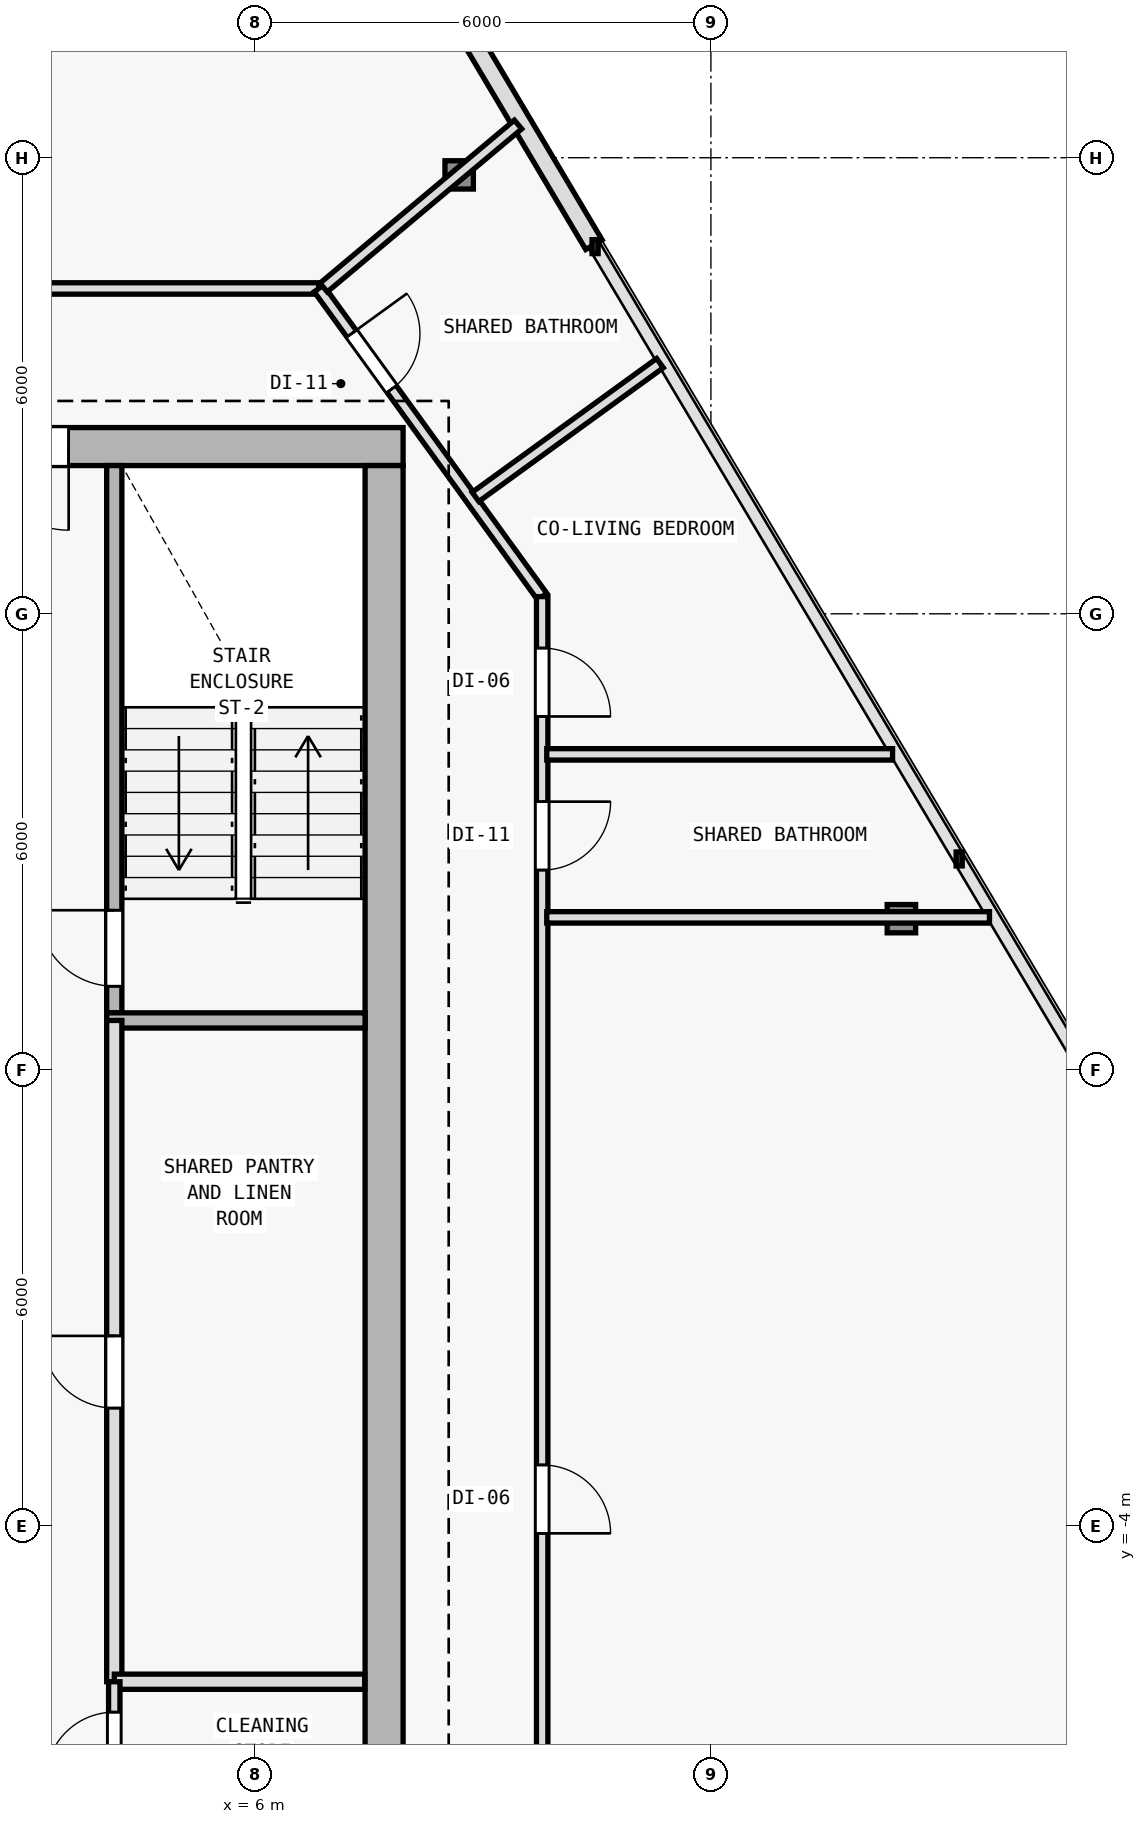
"""IFC4 building model, lengths in metres.
Left out: names, types, materials, properties, quantities, classifications, styles, units other than length and angle.
Written with IfcOpenShell. Run it as: python <this file> out.ifc"""

import sys

from ifc_helpers import new_model, si_unit, direction, frame, frame_2d, origin, origin_2d, place, context, subcontext, project, spatial, rectangle, i_section, extrude, element, fill, save


model = new_model("IFC4")
c1 = context("Model", 3, precision=1e-05, world=origin(), true_north=direction((0.0, 1.0)))
c2 = subcontext(c1, "Body", "Model", "MODEL_VIEW")
j1 = project(units=[si_unit("LENGTHUNIT", "METRE"), si_unit("PLANEANGLEUNIT", "RADIAN")], contexts=[c1])
p1 = place(None, origin())
s1 = spatial("IfcSite", under=j1, at=p1, CompositionType="ELEMENT")
p2 = place(p1, origin())
s2 = spatial("IfcBuilding", under=s1, at=p2, CompositionType="ELEMENT")
p3 = place(p2, frame((0.0, 0.0, 219.9)))
s3 = spatial("IfcBuildingStorey", under=s2, at=p3, CompositionType="ELEMENT", Elevation=219.9)
for number, where, z_axis, x_axis in (
    (1, (7.7, 10.2, 0.0), (0.0, 0.0, 1.0), (1.0, 0.0, 0.0)),
    (2, (7.7, 0.4, 0.0), (0.0, 0.0, 1.0), (1.0, 0.0, 0.0)),
):
    element("IfcColumn", number, at=place(p3, frame(where, z_axis=z_axis, x_axis=x_axis)), inside=s3, PredefinedType="COLUMN", context=c2, shape_type="SweptSolid", body=[
        extrude(i_section(OverallWidth=0.398, OverallDepth=0.387, WebThickness=0.013, FlangeThickness=0.022, FilletRadius=0.015, at=origin_2d()), origin(), (0.0, 0.0, 1.0), 3.6),
    ])
p4 = place(p3, frame((14.506, 3.989, 0.006), z_axis=(-0.018907314261, 0.009589680974, 0.999775250487), x_axis=(-0.452339157861, -0.891845999187, 0.0)))
e3 = element("IfcColumn", 3, at=p4, inside=s3, PredefinedType="COLUMN", context=c2, shape_type="SweptSolid", body=[
    extrude(i_section(OverallWidth=0.374, OverallDepth=0.372, WebThickness=0.012, FlangeThickness=0.02, FilletRadius=0.015, at=origin_2d()), origin(), (0.0, 0.0, 1.0), 3.59),
])
p5 = place(p3, frame((8.688, 13.774, 0.006), z_axis=(-0.011699842352, -0.002516826552, 0.999928387072), x_axis=(0.210305364179, -0.977635746993, 0.0)))
e4 = element("IfcColumn", 4, at=p5, inside=s3, PredefinedType="COLUMN", context=c2, shape_type="SweptSolid", body=[
    extrude(i_section(OverallWidth=0.374, OverallDepth=0.372, WebThickness=0.012, FlangeThickness=0.02, FilletRadius=0.015, at=origin_2d()), origin(), (0.0, 0.0, 1.0), 3.589),
])
p6 = place(p3, frame((5.396, 21.375, 0.0), z_axis=(0.0, 0.0, 1.0), x_axis=(0.511082771111, -0.85953150092, 0.0)))
e5 = element("IfcWall", 5, at=p6, inside=s3, PredefinedType="SOLIDWALL", context=c2, shape_type="SweptSolid", body=[
    extrude(rectangle(XDim=9.911, YDim=0.25, at=frame_2d((4.955, 0.0))), origin(), (0.0, 0.0, 1.0), 3.35),
])
p7 = place(p6, frame((4.205, 0.0, 0.62)))
e6 = element("IfcOpeningElement", 6, at=p7, cuts=e5, PredefinedType="OPENING", context=c2, shape_type="SweptSolid", body=[
    extrude(rectangle(XDim=1.5, YDim=2.0, at=frame_2d((0.75, 1.0))), frame((0.0, 0.135, 0.0), z_axis=(0.0, -1.0, 0.0), x_axis=(1.0, 0.0, 0.0)), (0.0, 0.0, 1.0), 0.27),
])
p8 = place(p3, frame((7.95, 10.2, 0.0), z_axis=(0.0, 0.0, 1.0), x_axis=(-1.0, 0.0, 0.0)))
e7 = element("IfcWall", 7, at=p8, inside=s3, PredefinedType="SHEAR", context=c2, shape_type="SweptSolid", body=[
    extrude(rectangle(XDim=15.9, YDim=0.5, at=frame_2d((7.95, 0.0))), origin(), (0.0, 0.0, 1.0), 3.35),
])
p9 = place(p8, frame((4.4, 0.0, 0.0)))
e8 = element("IfcOpeningElement", 8, at=p9, cuts=e7, PredefinedType="OPENING", context=c2, shape_type="SweptSolid", body=[
    extrude(rectangle(XDim=1.1, YDim=2.15, at=frame_2d((0.55, 1.075))), frame((0.0, 0.26, 0.0), z_axis=(0.0, -1.0, 0.0), x_axis=(1.0, 0.0, 0.0)), (0.0, 0.0, 1.0), 0.52),
])
p10 = place(p3, frame((7.7, 9.95, 0.0), z_axis=(0.0, 0.0, 1.0), x_axis=(0.0, -1.0, 0.0)))
e9 = element("IfcWall", 9, at=p10, inside=s3, PredefinedType="SHEAR", context=c2, shape_type="SweptSolid", body=[
    extrude(rectangle(XDim=19.1, YDim=0.5, at=frame_2d((9.55, 0.0))), origin(), (0.0, 0.0, 1.0), 3.35),
])
p11 = place(p3, frame((4.15, 2.75, 0.0), z_axis=(0.0, 0.0, 1.0), x_axis=(0.0, 1.0, 0.0)))
e10 = element("IfcWall", 10, at=p11, inside=s3, PredefinedType="SOLIDWALL", context=c2, shape_type="SweptSolid", body=[
    extrude(rectangle(XDim=7.2, YDim=0.2, at=frame_2d((3.6, 0.0))), origin(), (0.0, 0.0, 1.0), 3.35),
])
p12 = place(p11, frame((0.35, 0.0, 0.0)))
e11 = element("IfcOpeningElement", 11, at=p12, cuts=e10, PredefinedType="OPENING", context=c2, shape_type="SweptSolid", body=[
    extrude(rectangle(XDim=1.0, YDim=2.15, at=frame_2d((0.5, 1.075))), frame((0.0, 0.11, 0.0), z_axis=(0.0, -1.0, 0.0), x_axis=(1.0, 0.0, 0.0)), (0.0, 0.0, 1.0), 0.22),
])
p13 = place(p3, frame((4.05, 2.65, 0.0), z_axis=(0.0, 0.0, 1.0), x_axis=(1.0, 0.0, 0.0)))
e12 = element("IfcWall", 12, at=p13, inside=s3, PredefinedType="SOLIDWALL", context=c2, shape_type="SweptSolid", body=[
    extrude(rectangle(XDim=3.4, YDim=0.2, at=frame_2d((1.7, 0.0))), origin(), (0.0, 0.0, 1.0), 3.35),
])
p14 = place(p3, frame((4.15, -6.05, 0.0), z_axis=(0.0, 0.0, 1.0), x_axis=(0.0, 1.0, 0.0)))
e13 = element("IfcWall", 13, at=p14, inside=s3, PredefinedType="SOLIDWALL", context=c2, shape_type="SweptSolid", body=[
    extrude(rectangle(XDim=8.7, YDim=0.2, at=frame_2d((4.35, 0.0))), origin(), (0.0, 0.0, 1.0), 3.35),
])
p15 = place(p14, frame((3.6, 0.0, 0.0)))
e14 = element("IfcOpeningElement", 14, at=p15, cuts=e13, PredefinedType="OPENING", context=c2, shape_type="SweptSolid", body=[
    extrude(rectangle(XDim=0.95, YDim=2.1, at=frame_2d((0.475, 1.05))), frame((0.0, 0.11, 0.0), z_axis=(0.0, -1.0, 0.0), x_axis=(1.0, 0.0, 0.0)), (0.0, 0.0, 1.0), 0.22),
])
p16 = place(p3, frame((4.15, -6.05, 0.0), z_axis=(0.0, 0.0, 1.0), x_axis=(1.0, 0.0, 0.0)))
e15 = element("IfcWall", 15, at=p16, inside=s3, PredefinedType="SOLIDWALL", context=c2, shape_type="SweptSolid", body=[
    extrude(rectangle(XDim=3.295, YDim=0.2, at=frame_2d((1.647, 0.0))), origin(), (0.0, 0.0, 1.0), 3.35),
])
p17 = place(p3, frame((4.15, -9.145, 0.0), z_axis=(0.0, 0.0, 1.0), x_axis=(0.0, 1.0, 0.0)))
e16 = element("IfcWall", 16, at=p17, inside=s3, PredefinedType="PARTITIONING", context=c2, shape_type="SweptSolid", body=[
    extrude(rectangle(XDim=3.095, YDim=0.15, at=frame_2d((1.547, 0.0))), origin(), (0.0, 0.0, 1.0), 3.35),
])
p18 = place(p17, frame((0.245, 0.0, 0.0)))
e17 = element("IfcOpeningElement", 17, at=p18, cuts=e16, PredefinedType="OPENING", context=c2, shape_type="SweptSolid", body=[
    extrude(rectangle(XDim=0.9, YDim=2.1, at=frame_2d((0.45, 1.05))), frame((0.0, 0.085, 0.0), z_axis=(0.0, -1.0, 0.0), x_axis=(1.0, 0.0, 0.0)), (0.0, 0.0, 1.0), 0.17),
])
p19 = place(p17, frame((1.795, 0.0, 0.0)))
e18 = element("IfcOpeningElement", 18, at=p19, cuts=e16, PredefinedType="OPENING", context=c2, shape_type="SweptSolid", body=[
    extrude(rectangle(XDim=0.9, YDim=2.1, at=frame_2d((0.45, 1.05))), frame((0.0, 0.085, 0.0), z_axis=(0.0, -1.0, 0.0), x_axis=(1.0, 0.0, 0.0)), (0.0, 0.0, 1.0), 0.17),
])
p20 = place(p3, frame((-6.841, 12.28, 0.0), z_axis=(0.0, 0.0, 1.0), x_axis=(1.0, 0.0, 0.0)))
e19 = element("IfcWall", 19, at=p20, inside=s3, PredefinedType="PARTITIONING", context=c2, shape_type="SweptSolid", body=[
    extrude(rectangle(XDim=13.682, YDim=0.15, at=frame_2d((6.841, 0.0))), origin(), (0.0, 0.0, 1.0), 3.005),
])
p21 = place(p20, frame((6.391, 0.0, 0.0)))
e20 = element("IfcOpeningElement", 20, at=p21, cuts=e19, PredefinedType="OPENING", context=c2, shape_type="SweptSolid", body=[
    extrude(rectangle(XDim=0.9, YDim=2.1, at=frame_2d((0.45, 1.05))), frame((0.0, 0.085, 0.0), z_axis=(0.0, -1.0, 0.0), x_axis=(1.0, 0.0, 0.0)), (0.0, 0.0, 1.0), 0.17),
])
p22 = place(p3, frame((6.841, 12.28, 0.0), z_axis=(0.0, 0.0, 1.0), x_axis=(0.586956386413, -0.809618552436, 0.0)))
e21 = element("IfcWall", 21, at=p22, inside=s3, PredefinedType="PARTITIONING", context=c2, shape_type="SweptSolid", body=[
    extrude(rectangle(XDim=5.008, YDim=0.15, at=frame_2d((2.504, 0.0))), origin(), (0.0, 0.0, 1.0), 2.825),
])
p23 = place(p22, frame((0.734, 0.0, 0.0)))
e22 = element("IfcOpeningElement", 22, at=p23, cuts=e21, PredefinedType="OPENING", context=c2, shape_type="SweptSolid", body=[
    extrude(rectangle(XDim=0.9, YDim=2.1, at=frame_2d((0.45, 1.05))), frame((0.0, 0.085, 0.0), z_axis=(0.0, -1.0, 0.0), x_axis=(1.0, 0.0, 0.0)), (0.0, 0.0, 1.0), 0.17),
])
p24 = place(p3, frame((9.78, 8.226, 0.0), z_axis=(0.0, 0.0, 1.0), x_axis=(0.0, -1.0, 0.0)))
e23 = element("IfcWall", 23, at=p24, inside=s3, PredefinedType="PARTITIONING", context=c2, shape_type="SweptSolid", body=[
    extrude(rectangle(XDim=19.706, YDim=0.15, at=frame_2d((9.853, 0.0))), origin(), (0.0, 0.0, 1.0), 2.725),
])
p25 = place(p24, frame((11.424, 0.0, 0.0)))
e24 = element("IfcOpeningElement", 24, at=p25, cuts=e23, PredefinedType="OPENING", context=c2, shape_type="SweptSolid", body=[
    extrude(rectangle(XDim=0.9, YDim=2.1, at=frame_2d((0.45, 1.05))), frame((0.0, 0.085, 0.0), z_axis=(0.0, -1.0, 0.0), x_axis=(1.0, 0.0, 0.0)), (0.0, 0.0, 1.0), 0.17),
])
p26 = place(p24, frame((2.698, 0.0, 0.0)))
e25 = element("IfcOpeningElement", 25, at=p26, cuts=e23, PredefinedType="OPENING", context=c2, shape_type="SweptSolid", body=[
    extrude(rectangle(XDim=0.9, YDim=2.1, at=frame_2d((0.45, 1.05))), frame((0.0, 0.085, 0.0), z_axis=(0.0, -1.0, 0.0), x_axis=(1.0, 0.0, 0.0)), (0.0, 0.0, 1.0), 0.17),
])
p27 = place(p24, frame((0.677, 0.0, 0.0)))
e26 = element("IfcOpeningElement", 26, at=p27, cuts=e23, PredefinedType="OPENING", context=c2, shape_type="SweptSolid", body=[
    extrude(rectangle(XDim=0.9, YDim=2.1, at=frame_2d((0.45, 1.05))), frame((0.0, 0.085, 0.0), z_axis=(0.0, -1.0, 0.0), x_axis=(1.0, 0.0, 0.0)), (0.0, 0.0, 1.0), 0.17),
])
p28 = place(p3, frame((9.84, 4.006, 0.0), z_axis=(0.0, 0.0, 1.0), x_axis=(1.0, 0.0, 0.0)))
e27 = element("IfcWall", 27, at=p28, inside=s3, PredefinedType="PARTITIONING", context=c2, shape_type="SweptSolid", body=[
    extrude(rectangle(XDim=5.825, YDim=0.15, at=frame_2d((2.913, 0.0))), origin(), (0.0, 0.0, 1.0), 2.825),
])
p29 = place(p3, frame((6.905, 12.292, 0.0), z_axis=(0.0, 0.0, 1.0), x_axis=(0.766305376551, 0.642476513088, 0.0)))
e28 = element("IfcWall", 28, at=p29, inside=s3, PredefinedType="PARTITIONING", context=c2, shape_type="SweptSolid", body=[
    extrude(rectangle(XDim=3.338, YDim=0.15, at=frame_2d((1.669, 0.0))), origin(), (0.0, 0.0, 1.0), 2.975),
])
p30 = place(p3, frame((8.903, 9.538, 0.0), z_axis=(0.0, 0.0, 1.0), x_axis=(0.809591090344, 0.586994264397, 0.0)))
e29 = element("IfcWall", 29, at=p30, inside=s3, PredefinedType="PARTITIONING", context=c2, shape_type="SweptSolid", body=[
    extrude(rectangle(XDim=2.998, YDim=0.15, at=frame_2d((1.499, 0.0))), origin(), (0.0, 0.0, 1.0), 2.825),
])
p31 = place(p3, frame((9.84, 6.15, 0.0), z_axis=(0.0, 0.0, 1.0), x_axis=(1.0, 0.0, 0.0)))
e30 = element("IfcWall", 30, at=p31, inside=s3, PredefinedType="PARTITIONING", context=c2, shape_type="SweptSolid", body=[
    extrude(rectangle(XDim=4.55, YDim=0.15, at=frame_2d((2.275, 0.0))), origin(), (0.0, 0.0, 1.0), 2.825),
])
p32 = place(p9, origin())
e31 = element("IfcDoor", 31, at=p32, inside=s3, OperationType="SINGLE_SWING_LEFT", PredefinedType="DOOR", context=c2, shape_type="SweptSolid", body=[
    extrude(rectangle(XDim=1.1, YDim=2.15, at=frame_2d((0.55, 1.075))), frame((0.0, 0.025, 0.0), z_axis=(0.0, -1.0, 0.0), x_axis=(1.0, 0.0, 0.0)), (0.0, 0.0, 1.0), 0.05),
])
fill(e8, e31)
p33 = place(p12, origin())
e32 = element("IfcDoor", 32, at=p33, inside=s3, OperationType="SINGLE_SWING_RIGHT", PredefinedType="DOOR", context=c2, shape_type="SweptSolid", body=[
    extrude(rectangle(XDim=1.0, YDim=2.15, at=frame_2d((0.5, 1.075))), frame((0.0, 0.025, 0.0), z_axis=(0.0, -1.0, 0.0), x_axis=(1.0, 0.0, 0.0)), (0.0, 0.0, 1.0), 0.05),
])
fill(e11, e32)
p34 = place(p15, origin())
e33 = element("IfcDoor", 33, at=p34, inside=s3, OperationType="SINGLE_SWING_RIGHT", PredefinedType="DOOR", context=c2, shape_type="SweptSolid", body=[
    extrude(rectangle(XDim=0.95, YDim=2.1, at=frame_2d((0.475, 1.05))), frame((0.0, 0.025, 0.0), z_axis=(0.0, -1.0, 0.0), x_axis=(1.0, 0.0, 0.0)), (0.0, 0.0, 1.0), 0.05),
])
fill(e14, e33)
p35 = place(p19, origin())
e34 = element("IfcDoor", 34, at=p35, inside=s3, OperationType="SINGLE_SWING_LEFT", PredefinedType="DOOR", context=c2, shape_type="SweptSolid", body=[
    extrude(rectangle(XDim=0.9, YDim=2.1, at=frame_2d((0.45, 1.05))), frame((0.0, 0.025, 0.0), z_axis=(0.0, -1.0, 0.0), x_axis=(1.0, 0.0, 0.0)), (0.0, 0.0, 1.0), 0.05),
])
fill(e18, e34)
p36 = place(p25, origin())
e35 = element("IfcDoor", 35, at=p36, inside=s3, OperationType="SINGLE_SWING_RIGHT", PredefinedType="DOOR", context=c2, shape_type="SweptSolid", body=[
    extrude(rectangle(XDim=0.9, YDim=2.1, at=frame_2d((0.45, 1.05))), frame((0.0, 0.025, 0.0), z_axis=(0.0, -1.0, 0.0), x_axis=(1.0, 0.0, 0.0)), (0.0, 0.0, 1.0), 0.05),
])
fill(e24, e35)
p37 = place(p26, origin())
e36 = element("IfcDoor", 36, at=p37, inside=s3, OperationType="SINGLE_SWING_LEFT", PredefinedType="DOOR", context=c2, shape_type="SweptSolid", body=[
    extrude(rectangle(XDim=0.9, YDim=2.1, at=frame_2d((0.45, 1.05))), frame((0.0, 0.025, 0.0), z_axis=(0.0, -1.0, 0.0), x_axis=(1.0, 0.0, 0.0)), (0.0, 0.0, 1.0), 0.05),
])
fill(e25, e36)
p38 = place(p27, origin())
e37 = element("IfcDoor", 37, at=p38, inside=s3, OperationType="SINGLE_SWING_RIGHT", PredefinedType="DOOR", context=c2, shape_type="SweptSolid", body=[
    extrude(rectangle(XDim=0.9, YDim=2.1, at=frame_2d((0.45, 1.05))), frame((0.0, 0.025, 0.0), z_axis=(0.0, -1.0, 0.0), x_axis=(1.0, 0.0, 0.0)), (0.0, 0.0, 1.0), 0.05),
])
fill(e26, e37)
p39 = place(p23, origin())
e38 = element("IfcDoor", 38, at=p39, inside=s3, OperationType="SINGLE_SWING_LEFT", PredefinedType="DOOR", context=c2, shape_type="SweptSolid", body=[
    extrude(rectangle(XDim=0.9, YDim=2.1, at=frame_2d((0.45, 1.05))), frame((0.0, 0.025, 0.0), z_axis=(0.0, -1.0, 0.0), x_axis=(1.0, 0.0, 0.0)), (0.0, 0.0, 1.0), 0.05),
])
fill(e22, e38)
save(model, sys.argv[1])
